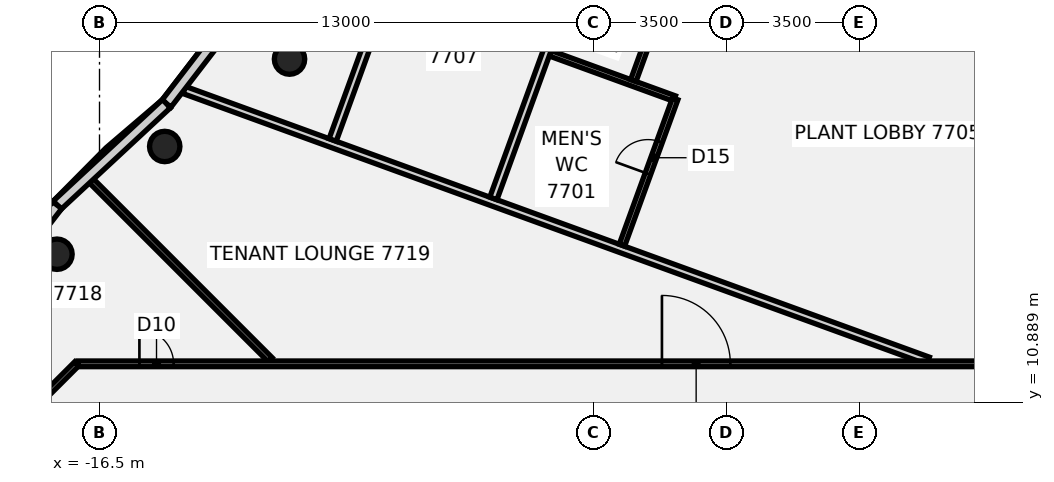
"""IFC4 building model, lengths in metres.
Left out: names, types, materials, properties, quantities, classifications, styles, units other than length and angle.
Written with IfcOpenShell. Run it as: python <this file> out.ifc"""

import sys

from ifc_helpers import new_model, si_unit, direction, frame, frame_2d, origin, origin_2d, place, context, subcontext, project, spatial, rectangle, circle, extrude, element, fill, save


model = new_model("IFC4")
c1 = context("Model", 3, precision=1e-05, world=origin(), true_north=direction((0.0, 1.0)))
c2 = subcontext(c1, "Body", "Model", "MODEL_VIEW")
j1 = project(units=[si_unit("LENGTHUNIT", "METRE"), si_unit("PLANEANGLEUNIT", "RADIAN")], contexts=[c1])
p1 = place(None, origin())
s1 = spatial("IfcSite", under=j1, at=p1, CompositionType="ELEMENT")
p2 = place(p1, origin())
s2 = spatial("IfcBuilding", under=s1, at=p2, CompositionType="ELEMENT")
p3 = place(p2, frame((0.0, 0.0, 313.4)))
s3 = spatial("IfcBuildingStorey", under=s2, at=p3, CompositionType="ELEMENT", Elevation=313.4)
for number, where, z_axis, x_axis in (
    (1, (-11.5, 19.919, -0.18), (0.0, 0.0, 1.0), (1.0, 0.0, 0.0)),
    (2, (-14.784, 17.619, -0.18), (0.0, 0.0, 1.0), (1.0, 0.0, 0.0)),
    (3, (-17.619, 14.784, -0.18), (0.0, 0.0, 1.0), (1.0, 0.0, 0.0)),
):
    element("IfcColumn", number, at=place(p3, frame(where, z_axis=z_axis, x_axis=x_axis)), inside=s3, PredefinedType="COLUMN", context=c2, shape_type="SweptSolid", body=[
        extrude(circle(Radius=0.4, at=origin_2d()), origin(), (0.0, 0.0, 1.0), 4.0),
    ])
p4 = place(p3, frame((-16.921, 16.921, 0.0), z_axis=(0.0, 0.0, 1.0), x_axis=(0.707106781187, -0.707106781187, 0.0)))
e4 = element("IfcWall", 4, at=p4, inside=s3, PredefinedType="PARTITIONING", context=c2, shape_type="SweptSolid", body=[
    extrude(rectangle(XDim=6.946, YDim=0.15, at=frame_2d((3.473, 0.0))), origin(), (0.0, 0.0, 1.0), 3.22),
])
p5 = place(p3, frame((-14.271, 19.106, 0.0), z_axis=(0.0, 0.0, 1.0), x_axis=(0.939707843555, -0.341978316216, 0.0)))
e5 = element("IfcWall", 5, at=p5, inside=s3, PredefinedType="PARTITIONING", context=c2, shape_type="SweptSolid", body=[
    extrude(rectangle(XDim=20.83, YDim=0.2, at=frame_2d((10.415, 0.0))), origin(), (0.0, 0.0, 1.0), 3.22),
])
p6 = place(p3, frame((-4.64, 20.071, 0.0), z_axis=(0.0, 0.0, 1.0), x_axis=(0.939625353143, -0.342204903138, 0.0)))
e6 = element("IfcWall", 6, at=p6, inside=s3, PredefinedType="PARTITIONING", context=c2, shape_type="SweptSolid", body=[
    extrude(rectangle(XDim=3.48, YDim=0.15, at=frame_2d((1.74, 0.0))), origin(), (0.0, 0.0, 1.0), 3.22),
])
p7 = place(p3, frame((-17.065, 11.9, 0.0), z_axis=(0.0, 0.0, 1.0), x_axis=(1.0, 0.0, 0.0)))
e7 = element("IfcWall", 7, at=p7, inside=s3, PredefinedType="PARTITIONING", context=c2, shape_type="SweptSolid", body=[
    extrude(rectangle(XDim=34.165, YDim=0.15, at=frame_2d((17.083, 0.0))), origin(), (0.0, 0.0, 1.0), 3.22),
])
p8 = place(p7, frame((24.544, 0.0, 0.0)))
e8 = element("IfcOpeningElement", 8, at=p8, cuts=e7, PredefinedType="OPENING", context=c2, shape_type="SweptSolid", body=[
    extrude(rectangle(XDim=1.8, YDim=2.1, at=frame_2d((0.9, 1.05))), frame((0.0, 0.085, 0.0), z_axis=(0.0, -1.0, 0.0), x_axis=(1.0, 0.0, 0.0)), (0.0, 0.0, 1.0), 0.17),
])
p9 = place(p7, frame((31.665, 0.0, 0.0)))
e9 = element("IfcOpeningElement", 9, at=p9, cuts=e7, PredefinedType="OPENING", context=c2, shape_type="SweptSolid", body=[
    extrude(rectangle(XDim=0.9, YDim=2.1, at=frame_2d((0.45, 1.05))), frame((0.0, 0.085, 0.0), z_axis=(0.0, -1.0, 0.0), x_axis=(1.0, 0.0, 0.0)), (0.0, 0.0, 1.0), 0.17),
])
p10 = place(p7, frame((1.615, 0.0, 0.0)))
e10 = element("IfcOpeningElement", 10, at=p10, cuts=e7, PredefinedType="OPENING", context=c2, shape_type="SweptSolid", body=[
    extrude(rectangle(XDim=0.9, YDim=2.1, at=frame_2d((0.45, 1.05))), frame((0.0, 0.085, 0.0), z_axis=(0.0, -1.0, 0.0), x_axis=(1.0, 0.0, 0.0)), (0.0, 0.0, 1.0), 0.17),
])
p11 = place(p7, frame((15.365, 0.0, 0.0)))
e11 = element("IfcOpeningElement", 11, at=p11, cuts=e7, PredefinedType="OPENING", context=c2, shape_type="SweptSolid", body=[
    extrude(rectangle(XDim=1.8, YDim=2.1, at=frame_2d((0.9, 1.05))), frame((0.0, 0.085, 0.0), z_axis=(0.0, -1.0, 0.0), x_axis=(1.0, 0.0, 0.0)), (0.0, 0.0, 1.0), 0.17),
])
p12 = place(p3, frame((-18.886, 10.114, 0.0), z_axis=(0.0, 0.0, 1.0), x_axis=(0.707106781187, 0.707106781187, 0.0)))
e12 = element("IfcWall", 12, at=p12, inside=s3, PredefinedType="PARTITIONING", context=c2, shape_type="SweptSolid", body=[
    extrude(rectangle(XDim=2.526, YDim=0.15, at=frame_2d((1.263, 0.0))), origin(), (0.0, 0.0, 1.0), 3.22),
])
p13 = place(p3, frame((-10.365, 17.791, 0.0), z_axis=(0.0, 0.0, 1.0), x_axis=(0.342032792834, 0.939688016645, 0.0)))
e13 = element("IfcWall", 13, at=p13, inside=s3, PredefinedType="PARTITIONING", context=c2, shape_type="SweptSolid", body=[
    extrude(rectangle(XDim=8.66, YDim=0.2, at=frame_2d((4.33, 0.0))), origin(), (0.0, 0.0, 1.0), 3.22),
])
p14 = place(p13, frame((6.6, 0.0, 0.0)))
e14 = element("IfcOpeningElement", 14, at=p14, cuts=e13, PredefinedType="OPENING", context=c2, shape_type="SweptSolid", body=[
    extrude(rectangle(XDim=1.4, YDim=2.1, at=frame_2d((0.7, 1.05))), frame((0.0, 0.11, 0.0), z_axis=(0.0, -1.0, 0.0), x_axis=(1.0, 0.0, 0.0)), (0.0, 0.0, 1.0), 0.22),
])
p15 = place(p3, frame((-6.136, 16.252, 0.0), z_axis=(0.0, 0.0, 1.0), x_axis=(0.341890434998, 0.939739820619, 0.0)))
e15 = element("IfcWall", 15, at=p15, inside=s3, PredefinedType="PARTITIONING", context=c2, shape_type="SweptSolid", body=[
    extrude(rectangle(XDim=6.518, YDim=0.2, at=frame_2d((3.259, 0.0))), origin(), (0.0, 0.0, 1.0), 3.22),
])
p16 = place(p3, frame((-2.753, 15.021, 0.0), z_axis=(0.0, 0.0, 1.0), x_axis=(0.341929559358, 0.939725585709, 0.0)))
e16 = element("IfcWall", 16, at=p16, inside=s3, PredefinedType="PARTITIONING", context=c2, shape_type="SweptSolid", body=[
    extrude(rectangle(XDim=4.099, YDim=0.15, at=frame_2d((2.05, 0.0))), origin(), (0.0, 0.0, 1.0), 3.22),
])
p17 = place(p16, frame((2.0, 0.0, 0.0)))
e17 = element("IfcOpeningElement", 17, at=p17, cuts=e16, PredefinedType="OPENING", context=c2, shape_type="SweptSolid", body=[
    extrude(rectangle(XDim=0.9, YDim=2.1, at=frame_2d((0.45, 1.05))), frame((0.0, 0.085, 0.0), z_axis=(0.0, -1.0, 0.0), x_axis=(1.0, 0.0, 0.0)), (0.0, 0.0, 1.0), 0.17),
])
p18 = place(p3, frame((-2.452, 19.354, 0.0), z_axis=(0.0, 0.0, 1.0), x_axis=(0.341765797908, 0.939785155969, 0.0)))
e18 = element("IfcWall", 18, at=p18, inside=s3, PredefinedType="PARTITIONING", context=c2, shape_type="SweptSolid", body=[
    extrude(rectangle(XDim=1.724, YDim=0.15, at=frame_2d((0.862, 0.0))), origin(), (0.0, 0.0, 1.0), 3.22),
])
p19 = place(p3, frame((-13.409, 20.474, 0.0), z_axis=(0.0, 0.0, 1.0), x_axis=(-0.609396950442, -0.792865282877, 0.0)))
e19 = element("IfcWall", 19, at=p19, inside=s3, PredefinedType="SOLIDWALL", context=c2, shape_type="SweptSolid", body=[
    extrude(rectangle(XDim=2.181, YDim=0.3, at=frame_2d((1.09, 0.0))), origin(), (0.0, 0.0, 1.0), 3.82),
])
p20 = place(p3, frame((-14.739, 18.745, 0.0), z_axis=(0.0, 0.0, 1.0), x_axis=(-0.73266715928, -0.680587124263, 0.0)))
e20 = element("IfcWall", 20, at=p20, inside=s3, PredefinedType="SOLIDWALL", context=c2, shape_type="SweptSolid", body=[
    extrude(rectangle(XDim=3.924, YDim=0.3, at=frame_2d((1.962, 0.0))), origin(), (0.0, 0.0, 1.0), 3.82),
])
p21 = place(p3, frame((-17.613, 16.075, 0.0), z_axis=(0.0, 0.0, 1.0), x_axis=(-0.610785688376, -0.79179596038, 0.0)))
e21 = element("IfcWall", 21, at=p21, inside=s3, PredefinedType="SOLIDWALL", context=c2, shape_type="SweptSolid", body=[
    extrude(rectangle(XDim=3.938, YDim=0.3, at=frame_2d((1.969, 0.0))), origin(), (0.0, 0.0, 1.0), 3.82),
])
p22 = place(p10, origin())
e22 = element("IfcDoor", 22, at=p22, inside=s3, OperationType="SINGLE_SWING_RIGHT", PredefinedType="DOOR", context=c2, shape_type="SweptSolid", body=[
    extrude(rectangle(XDim=0.9, YDim=2.1, at=frame_2d((0.45, 1.05))), frame((0.0, 0.025, 0.0), z_axis=(0.0, -1.0, 0.0), x_axis=(1.0, 0.0, 0.0)), (0.0, 0.0, 1.0), 0.05),
])
fill(e10, e22)
p23 = place(p11, origin())
e23 = element("IfcDoor", 23, at=p23, inside=s3, OperationType="DOUBLE_DOOR_SINGLE_SWING", PredefinedType="DOOR", context=c2, shape_type="SweptSolid", body=[
    extrude(rectangle(XDim=1.8, YDim=2.1, at=frame_2d((0.9, 1.05))), frame((0.0, 0.025, 0.0), z_axis=(0.0, -1.0, 0.0), x_axis=(1.0, 0.0, 0.0)), (0.0, 0.0, 1.0), 0.05),
])
fill(e11, e23)
p24 = place(p17, origin())
e24 = element("IfcDoor", 24, at=p24, inside=s3, OperationType="SINGLE_SWING_LEFT", PredefinedType="DOOR", context=c2, shape_type="SweptSolid", body=[
    extrude(rectangle(XDim=0.9, YDim=2.1, at=frame_2d((0.45, 1.05))), frame((0.0, 0.025, 0.0), z_axis=(0.0, -1.0, 0.0), x_axis=(1.0, 0.0, 0.0)), (0.0, 0.0, 1.0), 0.05),
])
fill(e17, e24)
save(model, sys.argv[1])
